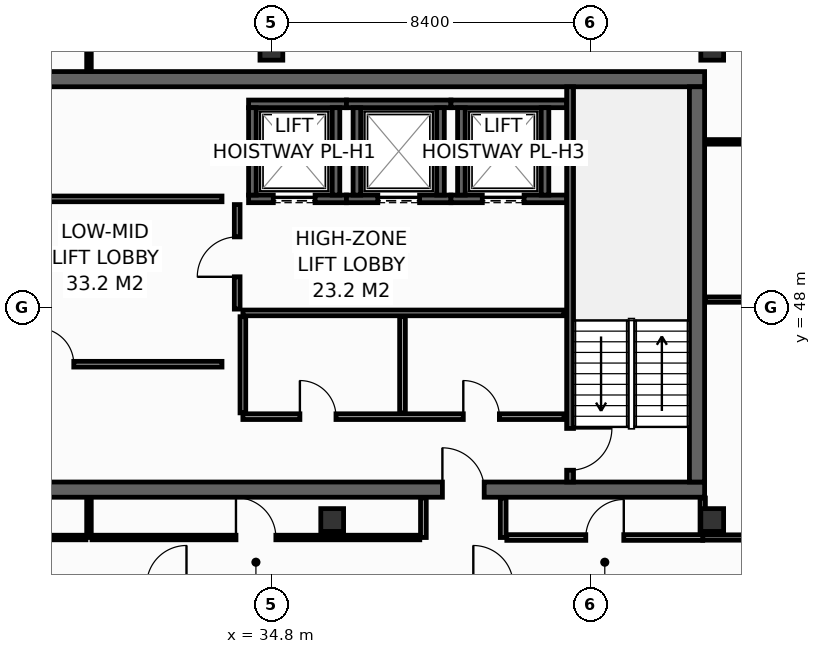
"""IFC4 building model, lengths in metres.
Left out: names, types, materials, properties, quantities, classifications, styles, units other than length and angle.
Written with IfcOpenShell. Run it as: python <this file> out.ifc"""

import sys

from ifc_helpers import new_model, si_unit, direction, frame, frame_2d, origin, origin_2d, place, context, subcontext, project, spatial, rectangle, hollow_rectangle, extrude, element, fill, save


model = new_model("IFC4")
c1 = context("Model", 3, precision=1e-05, world=origin(), true_north=direction((0.0, 1.0)))
c2 = subcontext(c1, "Body", "Model", "MODEL_VIEW")
j1 = project(units=[si_unit("LENGTHUNIT", "METRE"), si_unit("PLANEANGLEUNIT", "RADIAN")], contexts=[c1])
p1 = place(None, origin())
s1 = spatial("IfcSite", under=j1, at=p1, CompositionType="ELEMENT")
p2 = place(p1, origin())
s2 = spatial("IfcBuilding", under=s1, at=p2, CompositionType="ELEMENT")
p3 = place(p2, frame((0.0, 0.0, 310.4)))
s3 = spatial("IfcBuildingStorey", under=s2, at=p3, CompositionType="ELEMENT", Elevation=310.4)
p4 = place(p3, frame((13.7, 43.2, 0.0), z_axis=(0.0, 0.0, 1.0), x_axis=(1.0, 0.0, 0.0)))
e1 = element("IfcWall", 1, at=p4, inside=s3, PredefinedType="SHEAR", context=c2, shape_type="SweptSolid", body=[
    extrude(rectangle(XDim=32.5, YDim=0.4, at=frame_2d((16.25, 0.0))), origin(), (0.0, 0.0, 1.0), 3.55),
])
p5 = place(p4, frame((5.4, 0.0, 0.0)))
e2 = element("IfcOpeningElement", 2, at=p5, cuts=e1, PredefinedType="OPENING", context=c2, shape_type="SweptSolid", body=[
    extrude(rectangle(XDim=1.1, YDim=2.15, at=frame_2d((0.55, 1.075))), frame((0.0, 0.21, 0.0), z_axis=(0.0, -1.0, 0.0), x_axis=(1.0, 0.0, 0.0)), (0.0, 0.0, 1.0), 0.42),
])
p6 = place(p4, frame((25.6, 0.0, 0.0)))
e3 = element("IfcOpeningElement", 3, at=p6, cuts=e1, PredefinedType="OPENING", context=c2, shape_type="SweptSolid", body=[
    extrude(rectangle(XDim=1.1, YDim=2.15, at=frame_2d((0.55, 1.075))), frame((0.0, 0.21, 0.0), z_axis=(0.0, -1.0, 0.0), x_axis=(1.0, 0.0, 0.0)), (0.0, 0.0, 1.0), 0.42),
])
p7 = place(p3, frame((13.7, 54.0, 0.0), z_axis=(0.0, 0.0, 1.0), x_axis=(1.0, 0.0, 0.0)))
e4 = element("IfcWall", 4, at=p7, inside=s3, PredefinedType="SHEAR", context=c2, shape_type="SweptSolid", body=[
    extrude(rectangle(XDim=32.5, YDim=0.4, at=frame_2d((16.25, 0.0))), origin(), (0.0, 0.0, 1.0), 3.55),
])
p8 = place(p3, frame((46.0, 43.4, 0.0), z_axis=(0.0, 0.0, 1.0), x_axis=(0.0, 1.0, 0.0)))
e5 = element("IfcWall", 5, at=p8, inside=s3, PredefinedType="SHEAR", context=c2, shape_type="SweptSolid", body=[
    extrude(rectangle(XDim=10.4, YDim=0.4, at=frame_2d((5.2, 0.0))), origin(), (0.0, 0.0, 1.0), 3.55),
])
for number, where, z_axis, x_axis in (
    (6, (34.8, 54.8, 0.0), (0.0, 0.0, 1.0), (1.0, 0.0, 0.0)),
    (7, (46.4, 54.8, 0.0), (0.0, 0.0, 1.0), (1.0, 0.0, 0.0)),
    (8, (36.4, 42.4, 0.0), (0.0, 0.0, 1.0), (1.0, 0.0, 0.0)),
    (9, (46.4, 42.4, 0.0), (0.0, 0.0, 1.0), (1.0, 0.0, 0.0)),
):
    element("IfcColumn", number, at=place(p3, frame(where, z_axis=z_axis, x_axis=x_axis)), inside=s3, PredefinedType="COLUMN", context=c2, shape_type="SweptSolid", body=[
        extrude(hollow_rectangle(XDim=0.6, YDim=0.6, WallThickness=0.028, at=origin_2d()), origin(), (0.0, 0.0, 1.0), 3.8),
    ])
p9 = place(p3, frame((34.2, 50.85, 0.0), z_axis=(0.0, 0.0, 1.0), x_axis=(1.0, 0.0, 0.0)))
e10 = element("IfcWall", 10, at=p9, inside=s3, PredefinedType="SHEAR", context=c2, shape_type="SweptSolid", body=[
    extrude(rectangle(XDim=2.575, YDim=0.2, at=frame_2d((1.288, 0.0))), origin(), (0.0, 0.0, 1.0), 3.55),
])
p10 = place(p9, frame((0.65, 0.0, 0.0)))
e11 = element("IfcOpeningElement", 11, at=p10, cuts=e10, PredefinedType="OPENING", context=c2, shape_type="SweptSolid", body=[
    extrude(rectangle(XDim=1.1, YDim=2.2, at=frame_2d((0.55, 1.1))), frame((0.0, 0.11, 0.0), z_axis=(0.0, -1.0, 0.0), x_axis=(1.0, 0.0, 0.0)), (0.0, 0.0, 1.0), 0.22),
])
p11 = place(p3, frame((34.2, 53.35, 0.0), z_axis=(0.0, 0.0, 1.0), x_axis=(1.0, 0.0, 0.0)))
e12 = element("IfcWall", 12, at=p11, inside=s3, PredefinedType="SHEAR", context=c2, shape_type="SweptSolid", body=[
    extrude(rectangle(XDim=2.575, YDim=0.2, at=frame_2d((1.288, 0.0))), origin(), (0.0, 0.0, 1.0), 3.55),
])
for number, where, z_axis, x_axis in (
    (13, (34.3, 50.95, 0.0), (0.0, 0.0, 1.0), (0.0, 1.0, 0.0)),
    (14, (36.5, 50.95, 0.0), (0.0, 0.0, 1.0), (0.0, 1.0, 0.0)),
):
    element("IfcWall", number, at=place(p3, frame(where, z_axis=z_axis, x_axis=x_axis)), inside=s3, PredefinedType="SHEAR", context=c2, shape_type="SweptSolid", body=[
        extrude(rectangle(XDim=2.3, YDim=0.2, at=frame_2d((1.15, 0.0))), origin(), (0.0, 0.0, 1.0), 3.55),
    ])
p12 = place(p3, frame((36.775, 50.85, 0.0), z_axis=(0.0, 0.0, 1.0), x_axis=(1.0, 0.0, 0.0)))
e15 = element("IfcWall", 15, at=p12, inside=s3, PredefinedType="SHEAR", context=c2, shape_type="SweptSolid", body=[
    extrude(rectangle(XDim=2.75, YDim=0.2, at=frame_2d((1.375, 0.0))), origin(), (0.0, 0.0, 1.0), 3.55),
])
p13 = place(p12, frame((0.825, 0.0, 0.0)))
e16 = element("IfcOpeningElement", 16, at=p13, cuts=e15, PredefinedType="OPENING", context=c2, shape_type="SweptSolid", body=[
    extrude(rectangle(XDim=1.1, YDim=2.2, at=frame_2d((0.55, 1.1))), frame((0.0, 0.11, 0.0), z_axis=(0.0, -1.0, 0.0), x_axis=(1.0, 0.0, 0.0)), (0.0, 0.0, 1.0), 0.22),
])
p14 = place(p3, frame((36.775, 53.35, 0.0), z_axis=(0.0, 0.0, 1.0), x_axis=(1.0, 0.0, 0.0)))
e17 = element("IfcWall", 17, at=p14, inside=s3, PredefinedType="SHEAR", context=c2, shape_type="SweptSolid", body=[
    extrude(rectangle(XDim=2.75, YDim=0.2, at=frame_2d((1.375, 0.0))), origin(), (0.0, 0.0, 1.0), 3.55),
])
for number, where, z_axis, x_axis in (
    (18, (37.05, 50.95, 0.0), (0.0, 0.0, 1.0), (0.0, 1.0, 0.0)),
    (19, (39.25, 50.95, 0.0), (0.0, 0.0, 1.0), (0.0, 1.0, 0.0)),
):
    element("IfcWall", number, at=place(p3, frame(where, z_axis=z_axis, x_axis=x_axis)), inside=s3, PredefinedType="SHEAR", context=c2, shape_type="SweptSolid", body=[
        extrude(rectangle(XDim=2.3, YDim=0.2, at=frame_2d((1.15, 0.0))), origin(), (0.0, 0.0, 1.0), 3.55),
    ])
p15 = place(p3, frame((39.525, 50.85, 0.0), z_axis=(0.0, 0.0, 1.0), x_axis=(1.0, 0.0, 0.0)))
e20 = element("IfcWall", 20, at=p15, inside=s3, PredefinedType="SHEAR", context=c2, shape_type="SweptSolid", body=[
    extrude(rectangle(XDim=3.045, YDim=0.2, at=frame_2d((1.522, 0.0))), origin(), (0.0, 0.0, 1.0), 3.55),
])
p16 = place(p15, frame((0.825, 0.0, 0.0)))
e21 = element("IfcOpeningElement", 21, at=p16, cuts=e20, PredefinedType="OPENING", context=c2, shape_type="SweptSolid", body=[
    extrude(rectangle(XDim=1.1, YDim=2.2, at=frame_2d((0.55, 1.1))), frame((0.0, 0.11, 0.0), z_axis=(0.0, -1.0, 0.0), x_axis=(1.0, 0.0, 0.0)), (0.0, 0.0, 1.0), 0.22),
])
p17 = place(p3, frame((39.525, 53.35, 0.0), z_axis=(0.0, 0.0, 1.0), x_axis=(1.0, 0.0, 0.0)))
e22 = element("IfcWall", 22, at=p17, inside=s3, PredefinedType="SHEAR", context=c2, shape_type="SweptSolid", body=[
    extrude(rectangle(XDim=3.045, YDim=0.2, at=frame_2d((1.522, 0.0))), origin(), (0.0, 0.0, 1.0), 3.55),
])
for number, where, z_axis, x_axis in (
    (23, (39.8, 50.95, 0.0), (0.0, 0.0, 1.0), (0.0, 1.0, 0.0)),
    (24, (42.0, 50.95, 0.0), (0.0, 0.0, 1.0), (0.0, 1.0, 0.0)),
):
    element("IfcWall", number, at=place(p3, frame(where, z_axis=z_axis, x_axis=x_axis)), inside=s3, PredefinedType="SHEAR", context=c2, shape_type="SweptSolid", body=[
        extrude(rectangle(XDim=2.3, YDim=0.2, at=frame_2d((1.15, 0.0))), origin(), (0.0, 0.0, 1.0), 3.55),
    ])
p18 = place(p3, frame((42.66, 53.8, 0.0), z_axis=(0.0, 0.0, 1.0), x_axis=(0.0, -1.0, 0.0)))
e25 = element("IfcWall", 25, at=p18, inside=s3, PredefinedType="SHEAR", context=c2, shape_type="SweptSolid", body=[
    extrude(rectangle(XDim=10.4, YDim=0.18, at=frame_2d((5.2, 0.0))), origin(), (0.0, 0.0, 1.0), 3.55),
])
p19 = place(p18, frame((8.99, 0.0, 0.0)))
e26 = element("IfcOpeningElement", 26, at=p19, cuts=e25, PredefinedType="OPENING", context=c2, shape_type="SweptSolid", body=[
    extrude(rectangle(XDim=1.1, YDim=2.15, at=frame_2d((0.55, 1.075))), frame((0.0, 0.1, 0.0), z_axis=(0.0, -1.0, 0.0), x_axis=(1.0, 0.0, 0.0)), (0.0, 0.0, 1.0), 0.2),
])
p20 = place(p3, frame((33.9, 47.95, 0.0), z_axis=(0.0, 0.0, 1.0), x_axis=(0.0, 1.0, 0.0)))
e27 = element("IfcWall", 27, at=p20, inside=s3, PredefinedType="PARTITIONING", context=c2, shape_type="SweptSolid", body=[
    extrude(rectangle(XDim=2.75, YDim=0.15, at=frame_2d((1.375, 0.0))), origin(), (0.0, 0.0, 1.0), 3.55),
])
p21 = place(p20, frame((0.85, 0.0, 0.0)))
e28 = element("IfcOpeningElement", 28, at=p21, cuts=e27, PredefinedType="OPENING", context=c2, shape_type="SweptSolid", body=[
    extrude(rectangle(XDim=1.05, YDim=2.15, at=frame_2d((0.525, 1.075))), frame((0.0, 0.085, 0.0), z_axis=(0.0, -1.0, 0.0), x_axis=(1.0, 0.0, 0.0)), (0.0, 0.0, 1.0), 0.17),
])
p22 = place(p3, frame((34.05, 45.12, 0.0), z_axis=(0.0, 0.0, 1.0), x_axis=(1.0, 0.0, 0.0)))
e29 = element("IfcWall", 29, at=p22, inside=s3, PredefinedType="PARTITIONING", context=c2, shape_type="SweptSolid", body=[
    extrude(rectangle(XDim=8.45, YDim=0.15, at=frame_2d((4.225, 0.0))), origin(), (0.0, 0.0, 1.0), 3.55),
])
p23 = place(p22, frame((1.5, 0.0, 0.0)))
e30 = element("IfcOpeningElement", 30, at=p23, cuts=e29, PredefinedType="OPENING", context=c2, shape_type="SweptSolid", body=[
    extrude(rectangle(XDim=0.95, YDim=2.15, at=frame_2d((0.475, 1.075))), frame((0.0, 0.085, 0.0), z_axis=(0.0, -1.0, 0.0), x_axis=(1.0, 0.0, 0.0)), (0.0, 0.0, 1.0), 0.17),
])
p24 = place(p22, frame((5.8, 0.0, 0.0)))
e31 = element("IfcOpeningElement", 31, at=p24, cuts=e29, PredefinedType="OPENING", context=c2, shape_type="SweptSolid", body=[
    extrude(rectangle(XDim=0.95, YDim=2.15, at=frame_2d((0.475, 1.075))), frame((0.0, 0.085, 0.0), z_axis=(0.0, -1.0, 0.0), x_axis=(1.0, 0.0, 0.0)), (0.0, 0.0, 1.0), 0.17),
])
p25 = place(p3, frame((34.05, 47.85, 0.0), z_axis=(0.0, 0.0, 1.0), x_axis=(1.0, 0.0, 0.0)))
e32 = element("IfcWall", 32, at=p25, inside=s3, PredefinedType="PARTITIONING", context=c2, shape_type="SweptSolid", body=[
    extrude(rectangle(XDim=8.45, YDim=0.15, at=frame_2d((4.225, 0.0))), origin(), (0.0, 0.0, 1.0), 3.55),
])
for number, where, z_axis, x_axis in (
    (33, (38.25, 45.22, 0.0), (0.0, 0.0, 1.0), (0.0, 1.0, 0.0)),
    (34, (34.05, 45.22, 0.0), (0.0, 0.0, 1.0), (0.0, 1.0, 0.0)),
):
    element("IfcWall", number, at=place(p3, frame(where, z_axis=z_axis, x_axis=x_axis)), inside=s3, PredefinedType="PARTITIONING", context=c2, shape_type="SweptSolid", body=[
        extrude(rectangle(XDim=2.53, YDim=0.15, at=frame_2d((1.265, 0.0))), origin(), (0.0, 0.0, 1.0), 3.55),
    ])
p26 = place(p3, frame((25.85, 50.85, 0.0), z_axis=(0.0, 0.0, 1.0), x_axis=(1.0, 0.0, 0.0)))
e35 = element("IfcWall", 35, at=p26, inside=s3, PredefinedType="PARTITIONING", context=c2, shape_type="SweptSolid", body=[
    extrude(rectangle(XDim=7.65, YDim=0.15, at=frame_2d((3.825, 0.0))), origin(), (0.0, 0.0, 1.0), 3.55),
])
p27 = place(p26, frame((1.25, 0.0, 0.0)))
e36 = element("IfcOpeningElement", 36, at=p27, cuts=e35, PredefinedType="OPENING", context=c2, shape_type="SweptSolid", body=[
    extrude(rectangle(XDim=0.95, YDim=2.15, at=frame_2d((0.475, 1.075))), frame((0.0, 0.085, 0.0), z_axis=(0.0, -1.0, 0.0), x_axis=(1.0, 0.0, 0.0)), (0.0, 0.0, 1.0), 0.17),
])
p28 = place(p3, frame((25.85, 46.5, 0.0), z_axis=(0.0, 0.0, 1.0), x_axis=(1.0, 0.0, 0.0)))
e37 = element("IfcWall", 37, at=p28, inside=s3, PredefinedType="PARTITIONING", context=c2, shape_type="SweptSolid", body=[
    extrude(rectangle(XDim=7.65, YDim=0.15, at=frame_2d((3.825, 0.0))), origin(), (0.0, 0.0, 1.0), 3.55),
])
p29 = place(p28, frame((2.8, 0.0, 0.0)))
e38 = element("IfcOpeningElement", 38, at=p29, cuts=e37, PredefinedType="OPENING", context=c2, shape_type="SweptSolid", body=[
    extrude(rectangle(XDim=0.95, YDim=2.15, at=frame_2d((0.475, 1.075))), frame((0.0, 0.085, 0.0), z_axis=(0.0, -1.0, 0.0), x_axis=(1.0, 0.0, 0.0)), (0.0, 0.0, 1.0), 0.17),
])
p30 = place(p3, frame((46.15, 41.94, 0.0), z_axis=(0.0, 0.0, 1.0), x_axis=(1.0, 0.0, 0.0)))
e39 = element("IfcWall", 39, at=p30, inside=s3, PredefinedType="PARTITIONING", context=c2, shape_type="SweptSolid", body=[
    extrude(rectangle(XDim=4.05, YDim=0.14, at=frame_2d((2.025, 0.0))), origin(), (0.0, 0.0, 1.0), 3.55),
])
p31 = place(p3, frame((46.15, 42.03, 0.0), z_axis=(0.0, 0.0, 1.0), x_axis=(0.0, 1.0, 0.0)))
e40 = element("IfcWall", 40, at=p31, inside=s3, PredefinedType="PARTITIONING", context=c2, shape_type="SweptSolid", body=[
    extrude(rectangle(XDim=0.95, YDim=0.14, at=frame_2d((0.475, 0.0))), origin(), (0.0, 0.0, 1.0), 3.55),
])
p32 = place(p3, frame((46.22, 48.2, 0.0), z_axis=(0.0, 0.0, 1.0), x_axis=(1.0, 0.0, 0.0)))
e41 = element("IfcWall", 41, at=p32, inside=s3, PredefinedType="PARTITIONING", context=c2, shape_type="SweptSolid", body=[
    extrude(rectangle(XDim=3.98, YDim=0.14, at=frame_2d((1.99, 0.0))), origin(), (0.0, 0.0, 1.0), 3.55),
])
p33 = place(p3, frame((46.22, 52.35, 0.0), z_axis=(0.0, 0.0, 1.0), x_axis=(1.0, 0.0, 0.0)))
e42 = element("IfcWall", 42, at=p33, inside=s3, PredefinedType="PARTITIONING", context=c2, shape_type="SweptSolid", body=[
    extrude(rectangle(XDim=3.98, YDim=0.12, at=frame_2d((1.99, 0.0))), origin(), (0.0, 0.0, 1.0), 3.55),
])
p34 = place(p3, frame((30.0, 54.22, 0.0), z_axis=(0.0, 0.0, 1.0), x_axis=(0.0, 1.0, 0.0)))
e43 = element("IfcWall", 43, at=p34, inside=s3, PredefinedType="PARTITIONING", context=c2, shape_type="SweptSolid", body=[
    extrude(rectangle(XDim=1.775, YDim=0.12, at=frame_2d((0.888, 0.0))), origin(), (0.0, 0.0, 1.0), 2.935),
])
for number, where, z_axis, x_axis in (
    (44, (38.8, 41.94, 0.0), (0.0, 0.0, 1.0), (0.0, 1.0, 0.0)),
    (45, (40.9, 41.94, 0.0), (0.0, 0.0, 1.0), (0.0, 1.0, 0.0)),
):
    element("IfcWall", number, at=place(p3, frame(where, z_axis=z_axis, x_axis=x_axis)), inside=s3, PredefinedType="PARTITIONING", context=c2, shape_type="SweptSolid", body=[
        extrude(rectangle(XDim=1.04, YDim=0.15, at=frame_2d((0.52, 0.0))), origin(), (0.0, 0.0, 1.0), 3.55),
    ])
p35 = place(p3, frame((30.0, 41.94, 0.0), z_axis=(0.0, 0.0, 1.0), x_axis=(0.0, 1.0, 0.0)))
e46 = element("IfcWall", 46, at=p35, inside=s3, PredefinedType="PARTITIONING", context=c2, shape_type="SweptSolid", body=[
    extrude(rectangle(XDim=1.04, YDim=0.12, at=frame_2d((0.52, 0.0))), origin(), (0.0, 0.0, 1.0), 2.947),
])
p36 = place(p3, frame((20.795, 41.94, 0.0), z_axis=(0.0, 0.0, 1.0), x_axis=(1.0, 0.0, 0.0)))
e47 = element("IfcWall", 47, at=p36, inside=s3, PredefinedType="PARTITIONING", context=c2, shape_type="SweptSolid", body=[
    extrude(rectangle(XDim=9.125, YDim=0.12, at=frame_2d((4.562, 0.0))), origin(), (0.0, 0.0, 1.0), 3.55),
])
p37 = place(p36, frame((4.112, 0.0, 0.0)))
e48 = element("IfcOpeningElement", 48, at=p37, cuts=e47, PredefinedType="OPENING", context=c2, shape_type="SweptSolid", body=[
    extrude(rectangle(XDim=0.9, YDim=2.1, at=frame_2d((0.45, 1.05))), frame((0.0, 0.07, 0.0), z_axis=(0.0, -1.0, 0.0), x_axis=(1.0, 0.0, 0.0)), (0.0, 0.0, 1.0), 0.14),
])
p38 = place(p3, frame((30.08, 41.94, 0.0), z_axis=(0.0, 0.0, 1.0), x_axis=(1.0, 0.0, 0.0)))
e49 = element("IfcWall", 49, at=p38, inside=s3, PredefinedType="PARTITIONING", context=c2, shape_type="SweptSolid", body=[
    extrude(rectangle(XDim=8.625, YDim=0.12, at=frame_2d((4.312, 0.0))), origin(), (0.0, 0.0, 1.0), 3.55),
])
p39 = place(p38, frame((3.788, 0.0, 0.0)))
e50 = element("IfcOpeningElement", 50, at=p39, cuts=e49, PredefinedType="OPENING", context=c2, shape_type="SweptSolid", body=[
    extrude(rectangle(XDim=1.05, YDim=2.15, at=frame_2d((0.525, 1.075))), frame((0.0, 0.07, 0.0), z_axis=(0.0, -1.0, 0.0), x_axis=(1.0, 0.0, 0.0)), (0.0, 0.0, 1.0), 0.14),
])
p40 = place(p3, frame((40.995, 41.94, 0.0), z_axis=(0.0, 0.0, 1.0), x_axis=(1.0, 0.0, 0.0)))
e51 = element("IfcWall", 51, at=p40, inside=s3, PredefinedType="PARTITIONING", context=c2, shape_type="SweptSolid", body=[
    extrude(rectangle(XDim=5.155, YDim=0.15, at=frame_2d((2.577, 0.0))), origin(), (0.0, 0.0, 1.0), 3.55),
])
p41 = place(p40, frame((2.078, 0.0, 0.0)))
e52 = element("IfcOpeningElement", 52, at=p41, cuts=e51, PredefinedType="OPENING", context=c2, shape_type="SweptSolid", body=[
    extrude(rectangle(XDim=1.0, YDim=2.15, at=frame_2d((0.5, 1.075))), frame((0.0, 0.085, 0.0), z_axis=(0.0, -1.0, 0.0), x_axis=(1.0, 0.0, 0.0)), (0.0, 0.0, 1.0), 0.17),
])
p42 = place(p10, origin())
e53 = element("IfcDoor", 53, at=p42, inside=s3, OperationType="SLIDING_TO_LEFT", PredefinedType="DOOR", context=c2, shape_type="SweptSolid", body=[
    extrude(rectangle(XDim=1.1, YDim=2.2, at=frame_2d((0.55, 1.1))), frame((0.0, 0.025, 0.0), z_axis=(0.0, -1.0, 0.0), x_axis=(1.0, 0.0, 0.0)), (0.0, 0.0, 1.0), 0.05),
])
fill(e11, e53)
p43 = place(p13, origin())
e54 = element("IfcDoor", 54, at=p43, inside=s3, OperationType="SLIDING_TO_LEFT", PredefinedType="DOOR", context=c2, shape_type="SweptSolid", body=[
    extrude(rectangle(XDim=1.1, YDim=2.2, at=frame_2d((0.55, 1.1))), frame((0.0, 0.025, 0.0), z_axis=(0.0, -1.0, 0.0), x_axis=(1.0, 0.0, 0.0)), (0.0, 0.0, 1.0), 0.05),
])
fill(e16, e54)
p44 = place(p16, origin())
e55 = element("IfcDoor", 55, at=p44, inside=s3, OperationType="SLIDING_TO_LEFT", PredefinedType="DOOR", context=c2, shape_type="SweptSolid", body=[
    extrude(rectangle(XDim=1.1, YDim=2.2, at=frame_2d((0.55, 1.1))), frame((0.0, 0.025, 0.0), z_axis=(0.0, -1.0, 0.0), x_axis=(1.0, 0.0, 0.0)), (0.0, 0.0, 1.0), 0.05),
])
fill(e21, e55)
p45 = place(p19, origin())
e56 = element("IfcDoor", 56, at=p45, inside=s3, OperationType="SINGLE_SWING_LEFT", PredefinedType="DOOR", context=c2, shape_type="SweptSolid", body=[
    extrude(rectangle(XDim=1.1, YDim=2.15, at=frame_2d((0.55, 1.075))), frame((0.0, 0.025, 0.0), z_axis=(0.0, -1.0, 0.0), x_axis=(1.0, 0.0, 0.0)), (0.0, 0.0, 1.0), 0.05),
])
fill(e26, e56)
p46 = place(p6, origin())
e57 = element("IfcDoor", 57, at=p46, inside=s3, OperationType="SINGLE_SWING_LEFT", PredefinedType="DOOR", context=c2, shape_type="SweptSolid", body=[
    extrude(rectangle(XDim=1.1, YDim=2.15, at=frame_2d((0.55, 1.075))), frame((0.0, 0.025, 0.0), z_axis=(0.0, -1.0, 0.0), x_axis=(1.0, 0.0, 0.0)), (0.0, 0.0, 1.0), 0.05),
])
fill(e3, e57)
p47 = place(p21, origin())
e58 = element("IfcDoor", 58, at=p47, inside=s3, OperationType="SINGLE_SWING_LEFT", PredefinedType="DOOR", context=c2, shape_type="SweptSolid", body=[
    extrude(rectangle(XDim=1.05, YDim=2.15, at=frame_2d((0.525, 1.075))), frame((0.0, 0.025, 0.0), z_axis=(0.0, -1.0, 0.0), x_axis=(1.0, 0.0, 0.0)), (0.0, 0.0, 1.0), 0.05),
])
fill(e28, e58)
p48 = place(p23, origin())
e59 = element("IfcDoor", 59, at=p48, inside=s3, OperationType="SINGLE_SWING_LEFT", PredefinedType="DOOR", context=c2, shape_type="SweptSolid", body=[
    extrude(rectangle(XDim=0.95, YDim=2.15, at=frame_2d((0.475, 1.075))), frame((0.0, 0.025, 0.0), z_axis=(0.0, -1.0, 0.0), x_axis=(1.0, 0.0, 0.0)), (0.0, 0.0, 1.0), 0.05),
])
fill(e30, e59)
p49 = place(p24, origin())
e60 = element("IfcDoor", 60, at=p49, inside=s3, OperationType="SINGLE_SWING_LEFT", PredefinedType="DOOR", context=c2, shape_type="SweptSolid", body=[
    extrude(rectangle(XDim=0.95, YDim=2.15, at=frame_2d((0.475, 1.075))), frame((0.0, 0.025, 0.0), z_axis=(0.0, -1.0, 0.0), x_axis=(1.0, 0.0, 0.0)), (0.0, 0.0, 1.0), 0.05),
])
fill(e31, e60)
p50 = place(p29, origin())
e61 = element("IfcDoor", 61, at=p50, inside=s3, OperationType="SINGLE_SWING_LEFT", PredefinedType="DOOR", context=c2, shape_type="SweptSolid", body=[
    extrude(rectangle(XDim=0.95, YDim=2.15, at=frame_2d((0.475, 1.075))), frame((0.0, 0.025, 0.0), z_axis=(0.0, -1.0, 0.0), x_axis=(1.0, 0.0, 0.0)), (0.0, 0.0, 1.0), 0.05),
])
fill(e38, e61)
p51 = place(p39, origin())
e62 = element("IfcDoor", 62, at=p51, inside=s3, OperationType="SINGLE_SWING_LEFT", PredefinedType="DOOR", context=c2, shape_type="SweptSolid", body=[
    extrude(rectangle(XDim=1.05, YDim=2.15, at=frame_2d((0.525, 1.075))), frame((0.0, 0.025, 0.0), z_axis=(0.0, -1.0, 0.0), x_axis=(1.0, 0.0, 0.0)), (0.0, 0.0, 1.0), 0.05),
])
fill(e50, e62)
p52 = place(p41, origin())
e63 = element("IfcDoor", 63, at=p52, inside=s3, OperationType="SINGLE_SWING_RIGHT", PredefinedType="DOOR", context=c2, shape_type="SweptSolid", body=[
    extrude(rectangle(XDim=1.0, YDim=2.15, at=frame_2d((0.5, 1.075))), frame((0.0, 0.025, 0.0), z_axis=(0.0, -1.0, 0.0), x_axis=(1.0, 0.0, 0.0)), (0.0, 0.0, 1.0), 0.05),
])
fill(e52, e63)
save(model, sys.argv[1])
